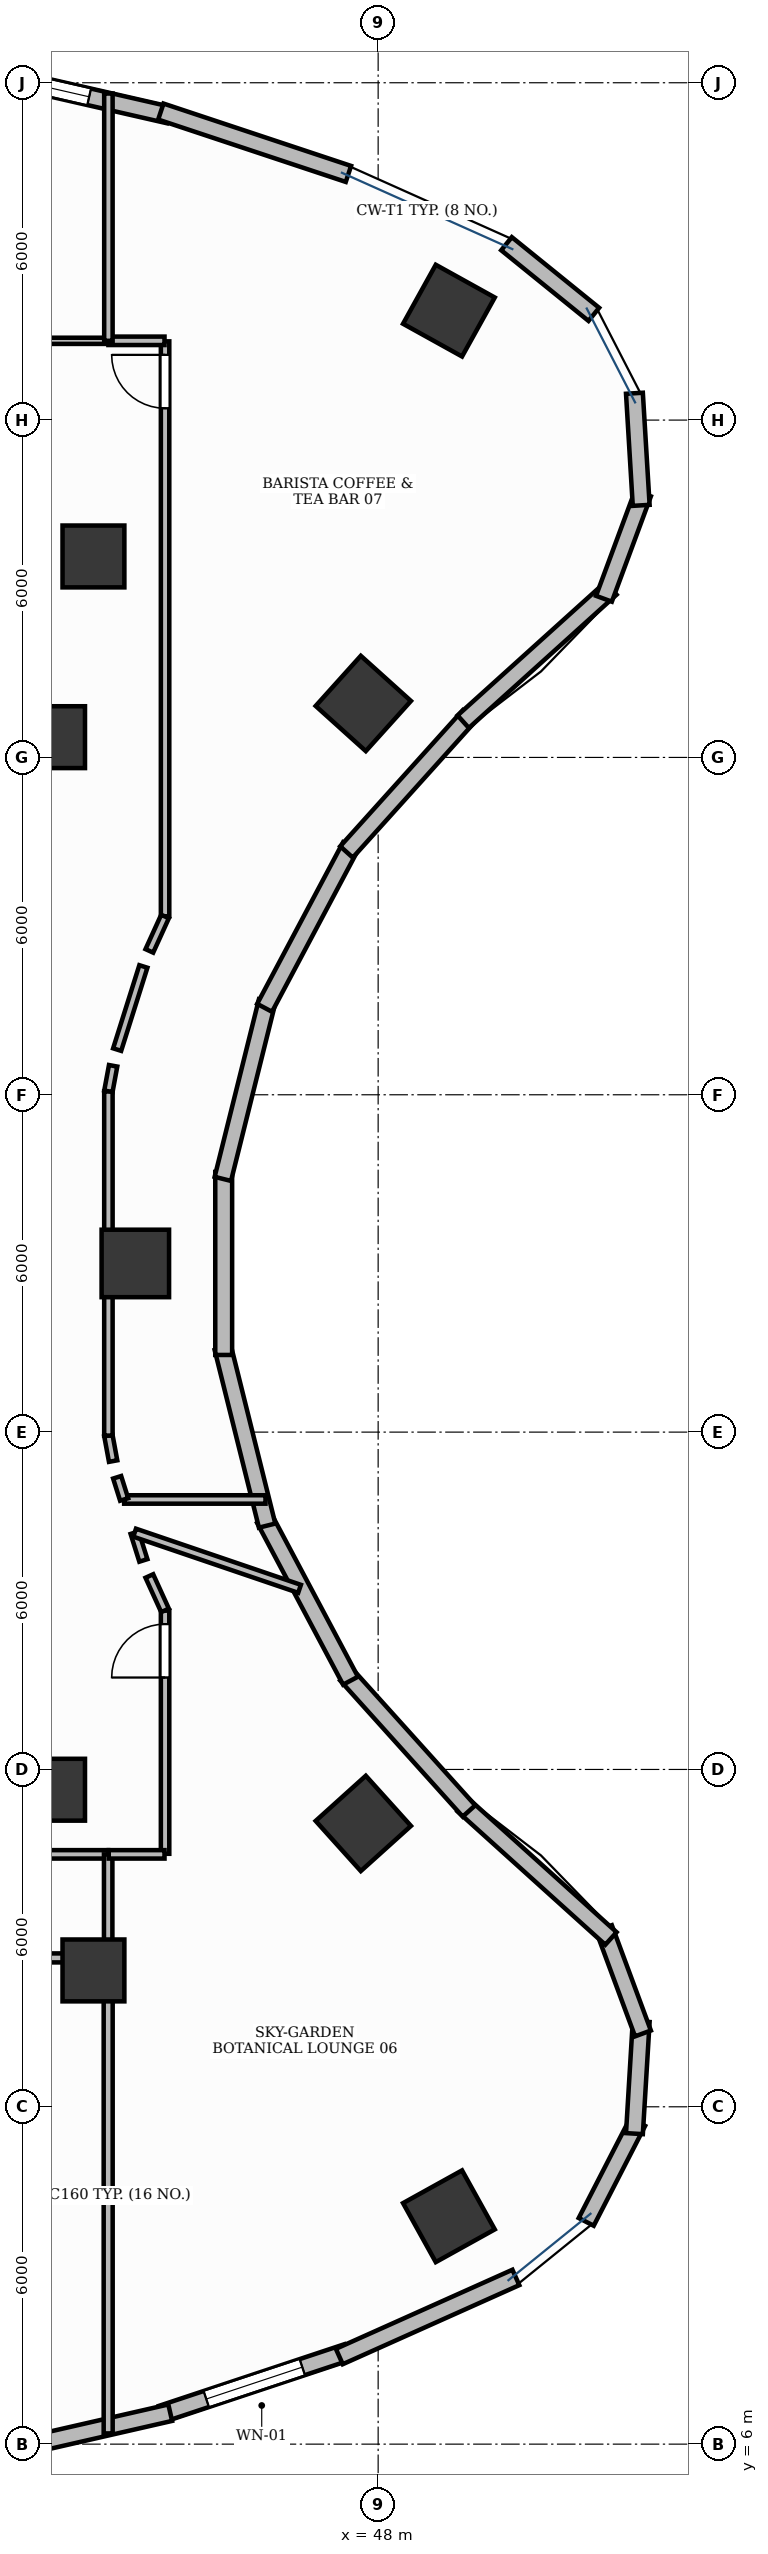
"""IFC4 building model, lengths in metres.
Left out: names, types, materials, properties, quantities, classifications, styles, units other than length and angle.
Written with IfcOpenShell. Run it as: python <this file> out.ifc"""

import sys

from ifc_helpers import new_model, si_unit, direction, frame, frame_2d, origin, origin_2d, place, context, subcontext, project, spatial, rectangle, extrude, element, fill, save


model = new_model("IFC4")
c1 = context("Model", 3, precision=1e-05, world=origin(), true_north=direction((0.0, 1.0)))
c2 = subcontext(c1, "Body", "Model", "MODEL_VIEW")
j1 = project(units=[si_unit("LENGTHUNIT", "METRE"), si_unit("PLANEANGLEUNIT", "RADIAN")], contexts=[c1])
p1 = place(None, origin())
s1 = spatial("IfcSite", under=j1, at=p1, CompositionType="ELEMENT")
p2 = place(p1, origin())
s2 = spatial("IfcBuilding", under=s1, at=p2, CompositionType="ELEMENT")
p3 = place(p2, frame((0.0, 0.0, 144.6)))
s3 = spatial("IfcBuildingStorey", under=s2, at=p3, CompositionType="ELEMENT", Elevation=144.6)
p4 = place(p3, frame((49.259, 43.947, -0.0), z_axis=(0.0, 0.0, 1.0), x_axis=(-0.874535078577, 0.484962262797, 0.0)))
e1 = element("IfcColumn", 1, at=p4, inside=s3, PredefinedType="COLUMN", context=c2, shape_type="SweptSolid", body=[
    extrude(rectangle(XDim=1.2, YDim=1.2, at=origin_2d()), origin(), (0.0, 0.0, 1.0), 3.881),
])
p5 = place(p3, frame((42.936, 39.575, -0.0), z_axis=(0.0, 0.0, 1.0), x_axis=(1.0, 0.0, 0.0)))
e2 = element("IfcColumn", 2, at=p5, inside=s3, PredefinedType="COLUMN", context=c2, shape_type="SweptSolid", body=[
    extrude(rectangle(XDim=1.1, YDim=1.1, at=origin_2d()), origin(), (0.0, 0.0, 1.0), 3.881),
])
p6 = place(p3, frame((49.259, 10.053, -0.0), z_axis=(0.0, 0.0, 1.0), x_axis=(0.874535078577, 0.484962262797, 0.0)))
e3 = element("IfcColumn", 3, at=p6, inside=s3, PredefinedType="COLUMN", context=c2, shape_type="SweptSolid", body=[
    extrude(rectangle(XDim=1.2, YDim=1.2, at=origin_2d()), origin(), (0.0, 0.0, 1.0), 3.881),
])
p7 = place(p3, frame((42.936, 14.425, -0.0), z_axis=(0.0, 0.0, 1.0), x_axis=(1.0, 0.0, 0.0)))
e4 = element("IfcColumn", 4, at=p7, inside=s3, PredefinedType="COLUMN", context=c2, shape_type="SweptSolid", body=[
    extrude(rectangle(XDim=1.1, YDim=1.1, at=origin_2d()), origin(), (0.0, 0.0, 1.0), 3.881),
])
p8 = place(p3, frame((47.736, 17.04, -0.0), z_axis=(0.0, 0.0, 1.0), x_axis=(-0.669130606359, 0.743144825477, 0.0)))
e5 = element("IfcColumn", 5, at=p8, inside=s3, PredefinedType="COLUMN", context=c2, shape_type="SweptSolid", body=[
    extrude(rectangle(XDim=1.2, YDim=1.2, at=origin_2d()), origin(), (0.0, 0.0, 1.0), 3.881),
])
p9 = place(p3, frame((42.236, 17.639, -0.0), z_axis=(0.0, 0.0, 1.0), x_axis=(1.0, 0.0, 0.0)))
e6 = element("IfcColumn", 6, at=p9, inside=s3, PredefinedType="COLUMN", context=c2, shape_type="SweptSolid", body=[
    extrude(rectangle(XDim=1.1, YDim=1.1, at=origin_2d()), origin(), (0.0, 0.0, 1.0), 3.881),
])
for number, where, z_axis, x_axis in (
    (7, (43.681, 27.0, -0.0), (0.0, 0.0, 1.0), (0.0, 1.0, 0.0)),
    (8, (47.736, 36.96, -0.0), (0.0, 0.0, 1.0), (0.669, 0.743, 0.0)),
):
    element("IfcColumn", number, at=place(p3, frame(where, z_axis=z_axis, x_axis=x_axis)), inside=s3, PredefinedType="COLUMN", context=c2, shape_type="SweptSolid", body=[
        extrude(rectangle(XDim=1.2, YDim=1.2, at=origin_2d()), origin(), (0.0, 0.0, 1.0), 3.881),
    ])
p10 = place(p3, frame((42.236, 36.361, -0.0), z_axis=(0.0, 0.0, 1.0), x_axis=(1.0, 0.0, 0.0)))
e9 = element("IfcColumn", 9, at=p10, inside=s3, PredefinedType="COLUMN", context=c2, shape_type="SweptSolid", body=[
    extrude(rectangle(XDim=1.1, YDim=1.1, at=origin_2d()), origin(), (0.0, 0.0, 1.0), 3.881),
])
p11 = place(p3, frame((44.278, 47.426, 0.0), z_axis=(0.0, 0.0, 1.0), x_axis=(-0.974836214244, 0.222922307989, 0.0)))
e10 = element("IfcWall", 10, at=p11, inside=s3, PredefinedType="STANDARD", context=c2, shape_type="SweptSolid", body=[
    extrude(rectangle(XDim=3.535, YDim=0.3, at=frame_2d((1.768, 0.0))), origin(), (0.0, 0.0, 1.0), 3.88),
])
p12 = place(p11, frame((1.454, 0.0, 0.9)))
e11 = element("IfcOpeningElement", 11, at=p12, cuts=e10, PredefinedType="OPENING", context=c2, shape_type="SweptSolid", body=[
    extrude(rectangle(XDim=1.8, YDim=2.1, at=frame_2d((0.9, 1.05))), frame((0.0, 0.165, 0.0), z_axis=(0.0, -1.0, 0.0), x_axis=(1.0, 0.0, 0.0)), (0.0, 0.0, 1.0), 0.33),
])
p13 = place(p3, frame((44.147, 6.538, 0.0), z_axis=(0.0, 0.0, 1.0), x_axis=(0.948949854506, 0.315426970364, 0.0)))
e12 = element("IfcWall", 12, at=p13, inside=s3, PredefinedType="STANDARD", context=c2, shape_type="SweptSolid", body=[
    extrude(rectangle(XDim=3.476, YDim=0.3, at=frame_2d((1.738, 0.0))), origin(), (0.0, 0.0, 1.0), 3.88),
])
p14 = place(p13, frame((0.838, 0.0, 0.9)))
e13 = element("IfcOpeningElement", 13, at=p14, cuts=e12, PredefinedType="OPENING", context=c2, shape_type="SweptSolid", body=[
    extrude(rectangle(XDim=1.8, YDim=2.1, at=frame_2d((0.9, 1.05))), frame((0.0, 0.165, 0.0), z_axis=(0.0, -1.0, 0.0), x_axis=(1.0, 0.0, 0.0)), (0.0, 0.0, 1.0), 0.33),
])
p15 = place(p3, frame((47.471, 46.378, 0.0), z_axis=(0.0, 0.0, 1.0), x_axis=(-0.948946814906, 0.315436114737, 0.0)))
e14 = element("IfcWall", 14, at=p15, inside=s3, PredefinedType="STANDARD", context=c2, shape_type="SweptSolid", body=[
    extrude(rectangle(XDim=3.516, YDim=0.3, at=frame_2d((1.758, 0.0))), origin(), (0.0, 0.0, 1.0), 3.88),
])
p16 = place(p3, frame((40.816, 5.762, 0.0), z_axis=(0.0, 0.0, 1.0), x_axis=(0.974841550422, 0.222898971669, 0.0)))
e15 = element("IfcWall", 15, at=p16, inside=s3, PredefinedType="STANDARD", context=c2, shape_type="SweptSolid", body=[
    extrude(rectangle(XDim=3.575, YDim=0.3, at=frame_2d((1.788, 0.0))), origin(), (0.0, 0.0, 1.0), 3.88),
])
p17 = place(p3, frame((47.309, 7.559, 0.0), z_axis=(0.0, 0.0, 1.0), x_axis=(0.912672725317, 0.408691199395, 0.0)))
e16 = element("IfcWall", 16, at=p17, inside=s3, PredefinedType="STANDARD", context=c2, shape_type="SweptSolid", body=[
    extrude(rectangle(XDim=3.441, YDim=0.3, at=frame_2d((1.72, 0.0))), origin(), (0.0, 0.0, 1.0), 3.88),
])
for number, where, z_axis, x_axis in (
    (17, (51.701, 9.953, 0.0), (0.0, 0.0, 1.0), (0.458, 0.889, 0.0)),
    (18, (52.559, 11.523, 0.0), (0.0, 0.0, 1.0), (0.06, 0.998, 0.0)),
):
    element("IfcWall", number, at=place(p3, frame(where, z_axis=z_axis, x_axis=x_axis)), inside=s3, PredefinedType="STANDARD", context=c2, shape_type="SweptSolid", body=[
        extrude(rectangle(XDim=1.998, YDim=0.3, at=frame_2d((0.999, 0.0))), origin(), (0.0, 0.0, 1.0), 3.88),
    ])
p18 = place(p3, frame((52.71, 13.305, 0.0), z_axis=(0.0, 0.0, 1.0), x_axis=(-0.347370087337, 0.937728117539, 0.0)))
e19 = element("IfcWall", 19, at=p18, inside=s3, PredefinedType="STANDARD", context=c2, shape_type="SweptSolid", body=[
    extrude(rectangle(XDim=1.997, YDim=0.3, at=frame_2d((0.999, 0.0))), origin(), (0.0, 0.0, 1.0), 3.88),
])
p19 = place(p3, frame((52.141, 14.994, 0.0), z_axis=(0.0, 0.0, 1.0), x_axis=(-0.74255963233, 0.669779958221, 0.0)))
e20 = element("IfcWall", 20, at=p19, inside=s3, PredefinedType="STANDARD", context=c2, shape_type="SweptSolid", body=[
    extrude(rectangle(XDim=3.539, YDim=0.3, at=frame_2d((1.77, 0.0))), origin(), (0.0, 0.0, 1.0), 3.88),
])
p20 = place(p3, frame((49.616, 17.262, 0.0), z_axis=(0.0, 0.0, 1.0), x_axis=(-0.669167727967, 0.743111399353, 0.0)))
e21 = element("IfcWall", 21, at=p20, inside=s3, PredefinedType="STANDARD", context=c2, shape_type="SweptSolid", body=[
    extrude(rectangle(XDim=3.255, YDim=0.3, at=frame_2d((1.628, 0.0))), origin(), (0.0, 0.0, 1.0), 3.88),
])
p21 = place(p3, frame((47.509, 19.579, 0.0), z_axis=(0.0, 0.0, 1.0), x_axis=(-0.469451284634, 0.882958374645, 0.0)))
e22 = element("IfcWall", 22, at=p21, inside=s3, PredefinedType="STANDARD", context=c2, shape_type="SweptSolid", body=[
    extrude(rectangle(XDim=3.256, YDim=0.3, at=frame_2d((1.628, 0.0))), origin(), (0.0, 0.0, 1.0), 2.605),
])
p22 = place(p3, frame((46.025, 22.337, 0.0), z_axis=(0.0, 0.0, 1.0), x_axis=(-0.241900409149, 0.970301083197, 0.0)))
e23 = element("IfcWall", 23, at=p22, inside=s3, PredefinedType="STANDARD", context=c2, shape_type="SweptSolid", body=[
    extrude(rectangle(XDim=3.256, YDim=0.3, at=frame_2d((1.628, 0.0))), origin(), (0.0, 0.0, 1.0), 2.605),
])
p23 = place(p3, frame((45.253, 25.372, 0.0), z_axis=(0.0, 0.0, 1.0), x_axis=(0.0, 1.0, 0.0)))
e24 = element("IfcWall", 24, at=p23, inside=s3, PredefinedType="STANDARD", context=c2, shape_type="SweptSolid", body=[
    extrude(rectangle(XDim=3.255, YDim=0.3, at=frame_2d((1.628, 0.0))), origin(), (0.0, 0.0, 1.0), 3.88),
])
p24 = place(p3, frame((45.238, 28.504, 0.0), z_axis=(0.0, 0.0, 1.0), x_axis=(0.241900409149, 0.970301083197, 0.0)))
e25 = element("IfcWall", 25, at=p24, inside=s3, PredefinedType="STANDARD", context=c2, shape_type="SweptSolid", body=[
    extrude(rectangle(XDim=3.256, YDim=0.3, at=frame_2d((1.628, 0.0))), origin(), (0.0, 0.0, 1.0), 2.605),
])
p25 = place(p3, frame((45.98, 31.547, 0.0), z_axis=(0.0, 0.0, 1.0), x_axis=(0.469451284634, 0.882958374645, 0.0)))
e26 = element("IfcWall", 26, at=p25, inside=s3, PredefinedType="STANDARD", context=c2, shape_type="SweptSolid", body=[
    extrude(rectangle(XDim=3.256, YDim=0.3, at=frame_2d((1.628, 0.0))), origin(), (0.0, 0.0, 1.0), 2.605),
])
p26 = place(p3, frame((47.437, 34.319, 0.0), z_axis=(0.0, 0.0, 1.0), x_axis=(0.669167727967, 0.743111399353, 0.0)))
e27 = element("IfcWall", 27, at=p26, inside=s3, PredefinedType="STANDARD", context=c2, shape_type="SweptSolid", body=[
    extrude(rectangle(XDim=3.255, YDim=0.3, at=frame_2d((1.628, 0.0))), origin(), (0.0, 0.0, 1.0), 3.88),
])
p27 = place(p3, frame((49.513, 36.636, 0.0), z_axis=(0.0, 0.0, 1.0), x_axis=(0.74255963233, 0.669779958221, 0.0)))
e28 = element("IfcWall", 28, at=p27, inside=s3, PredefinedType="STANDARD", context=c2, shape_type="SweptSolid", body=[
    extrude(rectangle(XDim=3.539, YDim=0.3, at=frame_2d((1.77, 0.0))), origin(), (0.0, 0.0, 1.0), 3.88),
])
p28 = place(p3, frame((52.016, 38.822, 0.0), z_axis=(0.0, 0.0, 1.0), x_axis=(0.347370087337, 0.937728117539, 0.0)))
e29 = element("IfcWall", 29, at=p28, inside=s3, PredefinedType="STANDARD", context=c2, shape_type="SweptSolid", body=[
    extrude(rectangle(XDim=1.997, YDim=0.3, at=frame_2d((0.999, 0.0))), origin(), (0.0, 0.0, 1.0), 3.88),
])
for number, where, z_axis, x_axis in (
    (30, (52.679, 40.483, 0.0), (0.0, 0.0, 1.0), (-0.06, 0.998, 0.0)),
    (31, (51.836, 43.881, 0.0), (0.0, 0.0, 1.0), (-0.777, 0.629, 0.0)),
):
    element("IfcWall", number, at=place(p3, frame(where, z_axis=z_axis, x_axis=x_axis)), inside=s3, PredefinedType="STANDARD", context=c2, shape_type="SweptSolid", body=[
        extrude(rectangle(XDim=1.998, YDim=0.3, at=frame_2d((0.999, 0.0))), origin(), (0.0, 0.0, 1.0), 3.88),
    ])
p29 = place(p3, frame((44.21, 16.5, 0.0), z_axis=(0.0, 0.0, 1.0), x_axis=(0.0, 1.0, 0.0)))
e32 = element("IfcWall", 32, at=p29, inside=s3, PredefinedType="PARTITIONING", context=c2, shape_type="SweptSolid", body=[
    extrude(rectangle(XDim=4.325, YDim=0.15, at=frame_2d((2.163, 0.0))), origin(), (0.0, 0.0, 1.0), 2.22),
])
p30 = place(p29, frame((3.135, 0.0, 0.0)))
e33 = element("IfcOpeningElement", 33, at=p30, cuts=e32, PredefinedType="OPENING", context=c2, shape_type="SweptSolid", body=[
    extrude(rectangle(XDim=0.95, YDim=2.15, at=frame_2d((0.475, 1.075))), frame((0.0, 0.09, 0.0), z_axis=(0.0, -1.0, 0.0), x_axis=(1.0, 0.0, 0.0)), (0.0, 0.0, 1.0), 0.18),
])
p31 = place(p3, frame((44.21, 33.175, 0.0), z_axis=(0.0, 0.0, 1.0), x_axis=(0.0, 1.0, 0.0)))
e34 = element("IfcWall", 34, at=p31, inside=s3, PredefinedType="PARTITIONING", context=c2, shape_type="SweptSolid", body=[
    extrude(rectangle(XDim=10.225, YDim=0.15, at=frame_2d((5.112, 0.0))), origin(), (0.0, 0.0, 1.0), 2.22),
])
p32 = place(p31, frame((9.035, 0.0, 0.0)))
e35 = element("IfcOpeningElement", 35, at=p32, cuts=e34, PredefinedType="OPENING", context=c2, shape_type="SweptSolid", body=[
    extrude(rectangle(XDim=0.95, YDim=2.15, at=frame_2d((0.475, 1.075))), frame((0.0, 0.09, 0.0), z_axis=(0.0, -1.0, 0.0), x_axis=(1.0, 0.0, 0.0)), (0.0, 0.0, 1.0), 0.18),
])
p33 = place(p3, frame((43.192, 43.41, 0.0), z_axis=(0.0, 0.0, 1.0), x_axis=(-1.0, 0.0, 0.0)))
e36 = element("IfcWall", 36, at=p33, inside=s3, PredefinedType="MOVABLE", context=c2, shape_type="SweptSolid", body=[
    extrude(rectangle(XDim=11.973, YDim=0.11, at=frame_2d((5.987, 0.0))), origin(), (0.0, 0.0, 1.0), 2.22),
])
p34 = place(p33, frame((7.15, 0.0, 0.0)))
e37 = element("IfcOpeningElement", 37, at=p34, cuts=e36, PredefinedType="OPENING", context=c2, shape_type="SweptSolid", body=[
    extrude(rectangle(XDim=0.95, YDim=2.15, at=frame_2d((0.475, 1.075))), frame((0.0, 0.07, 0.0), z_axis=(0.0, -1.0, 0.0), x_axis=(1.0, 0.0, 0.0)), (0.0, 0.0, 1.0), 0.14),
])
p35 = place(p3, frame((36.944, 14.648, 0.0), z_axis=(0.0, 0.0, 1.0), x_axis=(1.0, 0.0, 0.0)))
e38 = element("IfcWall", 38, at=p35, inside=s3, PredefinedType="PARTITIONING", context=c2, shape_type="SweptSolid", body=[
    extrude(rectangle(XDim=6.254, YDim=0.16, at=frame_2d((3.127, 0.0))), origin(), (0.0, 0.0, 1.0), 2.22),
])
p36 = place(p3, frame((43.198, 14.648, 0.0), z_axis=(0.0, 0.0, 1.0), x_axis=(0.0, -1.0, 0.0)))
e39 = element("IfcWall", 39, at=p36, inside=s3, PredefinedType="PARTITIONING", context=c2, shape_type="SweptSolid", body=[
    extrude(rectangle(XDim=8.457, YDim=0.16, at=frame_2d((4.229, 0.0))), origin(), (0.0, 0.0, 1.0), 2.22),
])
p37 = place(p3, frame((40.4, 16.49, 0.0), z_axis=(0.0, 0.0, 1.0), x_axis=(1.0, 0.0, 0.0)))
e40 = element("IfcWall", 40, at=p37, inside=s3, PredefinedType="PARTITIONING", context=c2, shape_type="SweptSolid", body=[
    extrude(rectangle(XDim=2.798, YDim=0.15, at=frame_2d((1.399, 0.0))), origin(), (0.0, 0.0, 1.0), 2.22),
])
p38 = place(p3, frame((43.198, 16.49, 0.0), z_axis=(0.0, 0.0, 1.0), x_axis=(0.0, -1.0, 0.0)))
e41 = element("IfcWall", 41, at=p38, inside=s3, PredefinedType="PARTITIONING", context=c2, shape_type="SweptSolid", body=[
    extrude(rectangle(XDim=1.832, YDim=0.15, at=frame_2d((0.916, 0.0))), origin(), (0.0, 0.0, 1.0), 2.22),
])
p39 = place(p3, frame((43.208, 16.49, 0.0), z_axis=(0.0, 0.0, 1.0), x_axis=(1.0, 0.0, 0.0)))
e42 = element("IfcWall", 42, at=p39, inside=s3, PredefinedType="PARTITIONING", context=c2, shape_type="SweptSolid", body=[
    extrude(rectangle(XDim=0.992, YDim=0.15, at=frame_2d((0.496, 0.0))), origin(), (0.0, 0.0, 1.0), 2.22),
])
p40 = place(p3, frame((44.209, 20.829, 0.0), z_axis=(0.0, 0.0, 1.0), x_axis=(-0.414377467152, 0.910105111905, 0.0)))
e43 = element("IfcWall", 43, at=p40, inside=s3, PredefinedType="PARTITIONING", context=c2, shape_type="SweptSolid", body=[
    extrude(rectangle(XDim=0.672, YDim=0.15, at=frame_2d((0.336, 0.0))), origin(), (0.0, 0.0, 1.0), 2.22),
])
p41 = place(p3, frame((43.824, 21.718, 0.0), z_axis=(0.0, 0.0, 1.0), x_axis=(-0.300747217066, 0.953703890852, 0.0)))
e44 = element("IfcWall", 44, at=p41, inside=s3, PredefinedType="PARTITIONING", context=c2, shape_type="SweptSolid", body=[
    extrude(rectangle(XDim=0.517, YDim=0.15, at=frame_2d((0.259, 0.0))), origin(), (0.0, 0.0, 1.0), 2.22),
])
p42 = place(p3, frame((43.668, 22.211, 0.0), z_axis=(0.0, 0.0, 1.0), x_axis=(0.946663200968, -0.322224741342, 0.0)))
e45 = element("IfcWall", 45, at=p42, inside=s3, PredefinedType="PARTITIONING", context=c2, shape_type="SweptSolid", body=[
    extrude(rectangle(XDim=3.099, YDim=0.15, at=frame_2d((1.549, 0.0))), origin(), (0.0, 0.0, 1.0), 2.22),
])
p43 = place(p3, frame((43.202, 27.168, 0.0), z_axis=(0.0, 0.0, 1.0), x_axis=(0.0, 1.0, 0.0)))
e46 = element("IfcWall", 46, at=p43, inside=s3, PredefinedType="PARTITIONING", context=c2, shape_type="SweptSolid", body=[
    extrude(rectangle(XDim=2.894, YDim=0.15, at=frame_2d((1.447, 0.0))), origin(), (0.0, 0.0, 1.0), 2.22),
])
p44 = place(p3, frame((43.202, 30.062, 0.0), z_axis=(0.0, 0.0, 1.0), x_axis=(0.182241022482, 0.983253888741, 0.0)))
e47 = element("IfcWall", 47, at=p44, inside=s3, PredefinedType="PARTITIONING", context=c2, shape_type="SweptSolid", body=[
    extrude(rectangle(XDim=0.461, YDim=0.15, at=frame_2d((0.23, 0.0))), origin(), (0.0, 0.0, 1.0), 2.22),
])
p45 = place(p3, frame((43.358, 30.803, 0.0), z_axis=(0.0, 0.0, 1.0), x_axis=(0.300641414783, 0.953737248783, 0.0)))
e48 = element("IfcWall", 48, at=p45, inside=s3, PredefinedType="PARTITIONING", context=c2, shape_type="SweptSolid", body=[
    extrude(rectangle(XDim=1.55, YDim=0.15, at=frame_2d((0.775, 0.0))), origin(), (0.0, 0.0, 1.0), 2.22),
])
p46 = place(p3, frame((43.93, 32.559, 0.0), z_axis=(0.0, 0.0, 1.0), x_axis=(0.414377467152, 0.910105111905, 0.0)))
e49 = element("IfcWall", 49, at=p46, inside=s3, PredefinedType="PARTITIONING", context=c2, shape_type="SweptSolid", body=[
    extrude(rectangle(XDim=0.672, YDim=0.15, at=frame_2d((0.336, 0.0))), origin(), (0.0, 0.0, 1.0), 2.22),
])
p47 = place(p3, frame((44.2, 43.41, 0.0), z_axis=(0.0, 0.0, 1.0), x_axis=(-1.0, 0.0, 0.0)))
e50 = element("IfcWall", 50, at=p47, inside=s3, PredefinedType="PARTITIONING", context=c2, shape_type="SweptSolid", body=[
    extrude(rectangle(XDim=0.998, YDim=0.15, at=frame_2d((0.499, 0.0))), origin(), (0.0, 0.0, 1.0), 2.22),
])
p48 = place(p3, frame((43.202, 43.41, 0.0), z_axis=(0.0, 0.0, 1.0), x_axis=(0.0, 1.0, 0.0)))
e51 = element("IfcWall", 51, at=p48, inside=s3, PredefinedType="PARTITIONING", context=c2, shape_type="SweptSolid", body=[
    extrude(rectangle(XDim=4.398, YDim=0.15, at=frame_2d((2.199, 0.0))), origin(), (0.0, 0.0, 1.0), 2.22),
])
p49 = place(p3, frame((45.996, 22.802, 0.0), z_axis=(0.0, 0.0, 1.0), x_axis=(-1.0, 0.0, 0.0)))
e52 = element("IfcWall", 52, at=p49, inside=s3, PredefinedType="PARTITIONING", context=c2, shape_type="SweptSolid", body=[
    extrude(rectangle(XDim=2.514, YDim=0.15, at=frame_2d((1.257, 0.0))), origin(), (0.0, 0.0, 1.0), 2.22),
])
p50 = place(p3, frame((43.482, 22.802, 0.0), z_axis=(0.0, 0.0, 1.0), x_axis=(-0.300425095419, 0.953805410995, 0.0)))
e53 = element("IfcWall", 53, at=p50, inside=s3, PredefinedType="PARTITIONING", context=c2, shape_type="SweptSolid", body=[
    extrude(rectangle(XDim=0.414, YDim=0.15, at=frame_2d((0.207, 0.0))), origin(), (0.0, 0.0, 1.0), 2.22),
])
p51 = place(p3, frame((43.286, 23.485, 0.0), z_axis=(0.0, 0.0, 1.0), x_axis=(-0.182241022482, 0.983253888741, 0.0)))
e54 = element("IfcWall", 54, at=p51, inside=s3, PredefinedType="PARTITIONING", context=c2, shape_type="SweptSolid", body=[
    extrude(rectangle(XDim=0.461, YDim=0.15, at=frame_2d((0.23, 0.0))), origin(), (0.0, 0.0, 1.0), 2.22),
])
p52 = place(p3, frame((43.202, 23.938, 0.0), z_axis=(0.0, 0.0, 1.0), x_axis=(0.0, 1.0, 0.0)))
e55 = element("IfcWall", 55, at=p52, inside=s3, PredefinedType="PARTITIONING", context=c2, shape_type="SweptSolid", body=[
    extrude(rectangle(XDim=3.226, YDim=0.15, at=frame_2d((1.613, 0.0))), origin(), (0.0, 0.0, 1.0), 2.22),
])
p53 = place(p12, origin())
e56 = element("IfcWindow", 56, at=p53, inside=s3, PartitioningType="SINGLE_PANEL", PredefinedType="WINDOW", context=c2, shape_type="SweptSolid", body=[
    extrude(rectangle(XDim=1.8, YDim=2.1, at=frame_2d((0.9, 1.05))), frame((0.0, 0.03, 0.0), z_axis=(0.0, -1.0, 0.0), x_axis=(1.0, 0.0, 0.0)), (0.0, 0.0, 1.0), 0.06),
])
fill(e11, e56)
p54 = place(p14, origin())
e57 = element("IfcWindow", 57, at=p54, inside=s3, PartitioningType="SINGLE_PANEL", PredefinedType="WINDOW", context=c2, shape_type="SweptSolid", body=[
    extrude(rectangle(XDim=1.8, YDim=2.1, at=frame_2d((0.9, 1.05))), frame((0.0, 0.03, 0.0), z_axis=(0.0, -1.0, 0.0), x_axis=(1.0, 0.0, 0.0)), (0.0, 0.0, 1.0), 0.06),
])
fill(e13, e57)
p55 = place(p30, origin())
e58 = element("IfcDoor", 58, at=p55, inside=s3, OperationType="SINGLE_SWING_LEFT", PredefinedType="DOOR", context=c2, shape_type="SweptSolid", body=[
    extrude(rectangle(XDim=0.95, YDim=2.15, at=frame_2d((0.475, 1.075))), frame((0.0, 0.025, 0.0), z_axis=(0.0, -1.0, 0.0), x_axis=(1.0, 0.0, 0.0)), (0.0, 0.0, 1.0), 0.05),
])
fill(e33, e58)
p56 = place(p32, origin())
e59 = element("IfcDoor", 59, at=p56, inside=s3, OperationType="SINGLE_SWING_RIGHT", PredefinedType="DOOR", context=c2, shape_type="SweptSolid", body=[
    extrude(rectangle(XDim=0.95, YDim=2.15, at=frame_2d((0.475, 1.075))), frame((0.0, 0.025, 0.0), z_axis=(0.0, -1.0, 0.0), x_axis=(1.0, 0.0, 0.0)), (0.0, 0.0, 1.0), 0.05),
])
fill(e35, e59)
save(model, sys.argv[1])
